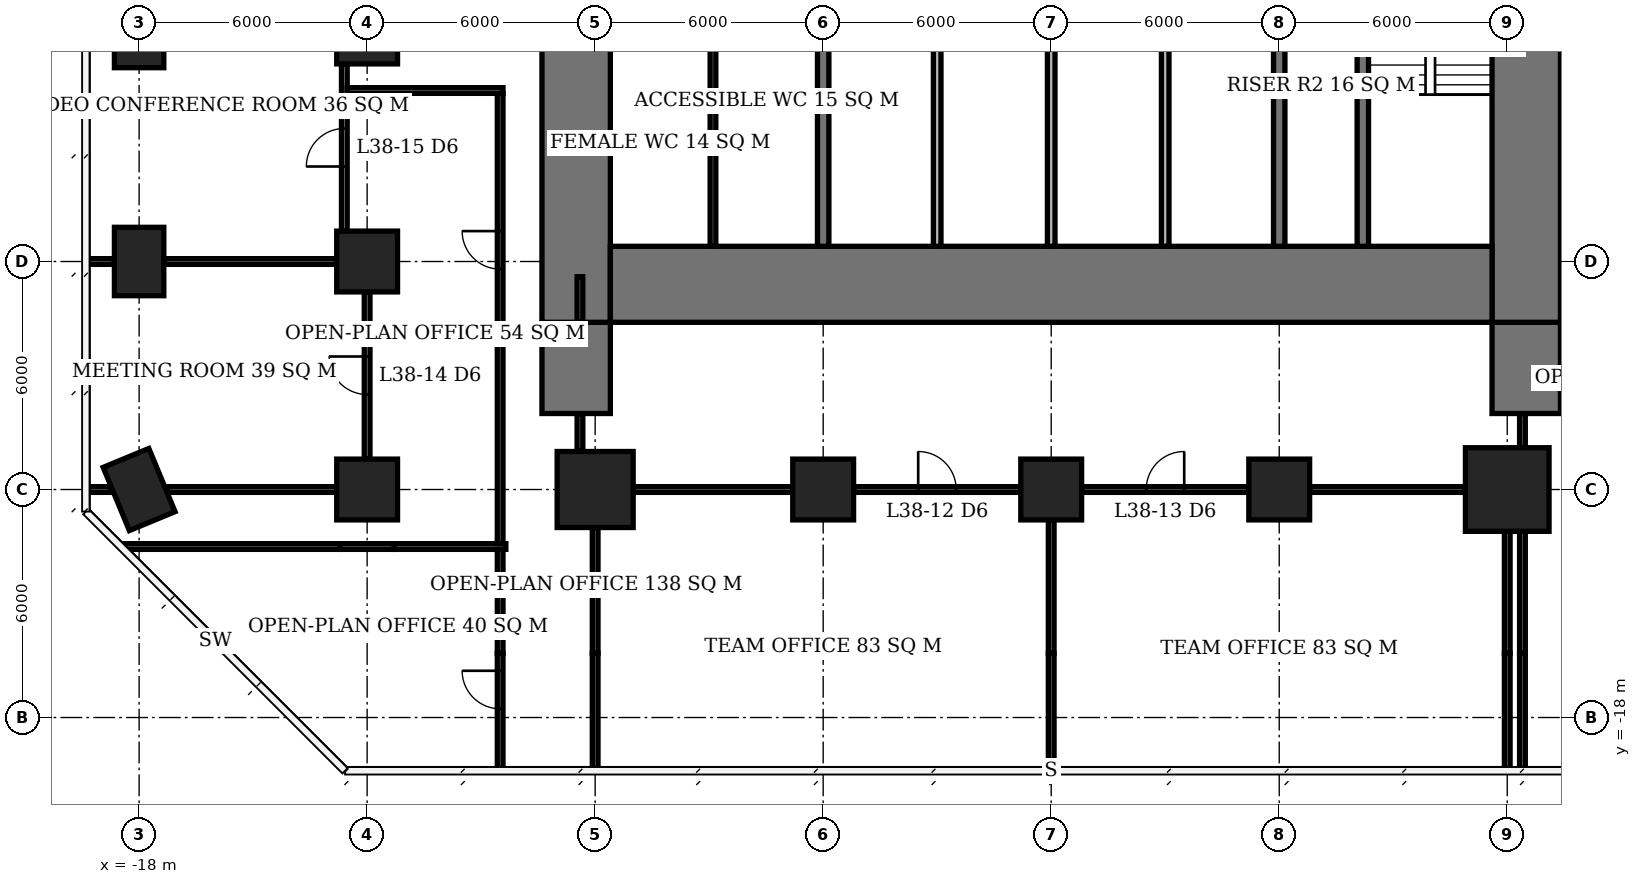
"""IFC4 building model, lengths in metres.
Left out: names, types, materials, properties, quantities, classifications, styles, units other than length and angle.
Written with IfcOpenShell. Run it as: python <this file> out.ifc"""

import sys

from ifc_helpers import new_model, si_unit, direction, frame, frame_2d, origin, origin_2d, place, context, subcontext, project, spatial, rectangle, extrude, element, fill, save


model = new_model("IFC4")
c1 = context("Model", 3, precision=1e-05, world=origin(), true_north=direction((0.0, 1.0)))
c2 = subcontext(c1, "Body", "Model", "MODEL_VIEW")
j1 = project(units=[si_unit("LENGTHUNIT", "METRE"), si_unit("PLANEANGLEUNIT", "RADIAN")], contexts=[c1])
p1 = place(None, origin())
s1 = spatial("IfcSite", under=j1, at=p1, CompositionType="ELEMENT")
p2 = place(p1, origin())
s2 = spatial("IfcBuilding", under=s1, at=p2, CompositionType="ELEMENT")
p3 = place(p2, frame((0.0, 0.0, 156.2)))
s3 = spatial("IfcBuildingStorey", under=s2, at=p3, CompositionType="ELEMENT", Elevation=156.2)
for number, where, z_axis, x_axis in (
    (1, (-18.0, -12.0, 0.0), (0.0, 0.0, 1.0), (-0.383, 0.924, 0.0)),
    (2, (-18.0, -6.0, 0.0), (0.0, 0.0, 1.0), (0.0, 1.0, 0.0)),
    (3, (-18.0, 0.0, 0.0), (0.0, 0.0, 1.0), (0.0, 1.0, 0.0)),
):
    element("IfcColumn", number, at=place(p3, frame(where, z_axis=z_axis, x_axis=x_axis)), inside=s3, PredefinedType="COLUMN", context=c2, shape_type="SweptSolid", body=[
        extrude(rectangle(XDim=1.8, YDim=1.3, at=origin_2d()), origin(), (0.0, 0.0, 1.0), 3.9),
    ])
for number, where, z_axis, x_axis in (
    (4, (-12.0, -12.0, 0.0), (0.0, 0.0, 1.0), (1.0, 0.0, 0.0)),
    (5, (-12.0, -6.0, 0.0), (0.0, 0.0, 1.0), (1.0, 0.0, 0.0)),
    (6, (-12.0, 0.0, 0.0), (0.0, 0.0, 1.0), (1.0, 0.0, 0.0)),
):
    element("IfcColumn", number, at=place(p3, frame(where, z_axis=z_axis, x_axis=x_axis)), inside=s3, PredefinedType="COLUMN", context=c2, shape_type="SweptSolid", body=[
        extrude(rectangle(XDim=1.6, YDim=1.6, at=origin_2d()), origin(), (0.0, 0.0, 1.0), 3.9),
    ])
p4 = place(p3, frame((-6.0, -12.0, 0.0), z_axis=(0.0, 0.0, 1.0), x_axis=(1.0, 0.0, 0.0)))
e7 = element("IfcColumn", 7, at=p4, inside=s3, PredefinedType="COLUMN", context=c2, shape_type="SweptSolid", body=[
    extrude(rectangle(XDim=2.0, YDim=2.0, at=origin_2d()), origin(), (0.0, 0.0, 1.0), 3.9),
])
for number, where, z_axis, x_axis in (
    (8, (0.0, -12.0, 0.0), (0.0, 0.0, 1.0), (1.0, 0.0, 0.0)),
    (9, (6.0, -12.0, 0.0), (0.0, 0.0, 1.0), (1.0, 0.0, 0.0)),
    (10, (12.0, -12.0, 0.0), (0.0, 0.0, 1.0), (1.0, 0.0, 0.0)),
):
    element("IfcColumn", number, at=place(p3, frame(where, z_axis=z_axis, x_axis=x_axis)), inside=s3, PredefinedType="COLUMN", context=c2, shape_type="SweptSolid", body=[
        extrude(rectangle(XDim=1.6, YDim=1.6, at=origin_2d()), origin(), (0.0, 0.0, 1.0), 3.9),
    ])
p5 = place(p3, frame((18.0, -12.0, 0.0), z_axis=(0.0, 0.0, 1.0), x_axis=(1.0, 0.0, 0.0)))
e11 = element("IfcColumn", 11, at=p5, inside=s3, PredefinedType="COLUMN", context=c2, shape_type="SweptSolid", body=[
    extrude(rectangle(XDim=2.2, YDim=2.2, at=origin_2d()), origin(), (0.0, 0.0, 1.0), 3.9),
])
p6 = place(p3, frame((-5.6, -6.6, 0.0), z_axis=(0.0, 0.0, 1.0), x_axis=(1.0, 0.0, 0.0)))
e12 = element("IfcWall", 12, at=p6, inside=s3, PredefinedType="SHEAR", context=c2, shape_type="SweptSolid", body=[
    extrude(rectangle(XDim=23.2, YDim=2.0, at=frame_2d((11.6, 0.0))), origin(), (0.0, 0.0, 1.0), 3.9),
])
p7 = place(p3, frame((-6.5, -7.6, 0.0), z_axis=(0.0, 0.0, 1.0), x_axis=(0.0, 1.0, 0.0)))
e13 = element("IfcWall", 13, at=p7, inside=s3, PredefinedType="SHEAR", context=c2, shape_type="SweptSolid", body=[
    extrude(rectangle(XDim=21.2, YDim=1.8, at=frame_2d((10.6, 0.0))), origin(), (0.0, 0.0, 1.0), 3.9),
])
p8 = place(p7, frame((7.8, 0.0, 0.0)))
e14 = element("IfcOpeningElement", 14, at=p8, cuts=e13, PredefinedType="OPENING", context=c2, shape_type="SweptSolid", body=[
    extrude(rectangle(XDim=1.8, YDim=2.4, at=frame_2d((0.9, 1.2))), frame((0.0, 0.91, 0.0), z_axis=(0.0, -1.0, 0.0), x_axis=(1.0, 0.0, 0.0)), (0.0, 0.0, 1.0), 1.82),
])
p9 = place(p3, frame((18.5, -7.6, 0.0), z_axis=(0.0, 0.0, 1.0), x_axis=(0.0, 1.0, 0.0)))
e15 = element("IfcWall", 15, at=p9, inside=s3, PredefinedType="SHEAR", context=c2, shape_type="SweptSolid", body=[
    extrude(rectangle(XDim=21.2, YDim=1.8, at=frame_2d((10.6, 0.0))), origin(), (0.0, 0.0, 1.0), 3.9),
])
p10 = place(p9, frame((9.2, 0.0, 0.0)))
e16 = element("IfcOpeningElement", 16, at=p10, cuts=e15, PredefinedType="OPENING", context=c2, shape_type="SweptSolid", body=[
    extrude(rectangle(XDim=1.8, YDim=2.4, at=frame_2d((0.9, 1.2))), frame((0.0, 0.91, 0.0), z_axis=(0.0, -1.0, 0.0), x_axis=(1.0, 0.0, 0.0)), (0.0, 0.0, 1.0), 1.82),
])
for number, where, z_axis, x_axis in (
    (17, (-6.5, -10.0, 0.0), (0.0, 0.0, 1.0), (0.0, 1.0, 0.0)),
    (18, (18.5, -10.0, 0.0), (0.0, 0.0, 1.0), (0.0, 1.0, 0.0)),
):
    element("IfcWall", number, at=place(p3, frame(where, z_axis=z_axis, x_axis=x_axis)), inside=s3, PredefinedType="SHEAR", context=c2, shape_type="SweptSolid", body=[
        extrude(rectangle(XDim=2.4, YDim=1.8, at=frame_2d((1.2, 0.0))), origin(), (0.0, 0.0, 1.0), 3.9),
    ])
for number, where, z_axis, x_axis in (
    (19, (0.0, -5.6, 0.0), (0.0, 0.0, 1.0), (0.0, 1.0, 0.0)),
    (20, (12.0, -5.6, 0.0), (0.0, 0.0, 1.0), (0.0, 1.0, 0.0)),
):
    element("IfcWall", number, at=place(p3, frame(where, z_axis=z_axis, x_axis=x_axis)), inside=s3, PredefinedType="SHEAR", context=c2, shape_type="SweptSolid", body=[
        extrude(rectangle(XDim=5.45, YDim=0.3, at=frame_2d((2.725, 0.0))), origin(), (0.0, 0.0, 1.0), 3.9),
    ])
p11 = place(p3, frame((14.2, -5.6, 0.0), z_axis=(0.0, 0.0, 1.0), x_axis=(0.0, 1.0, 0.0)))
e21 = element("IfcWall", 21, at=p11, inside=s3, PredefinedType="SHEAR", context=c2, shape_type="SweptSolid", body=[
    extrude(rectangle(XDim=8.45, YDim=0.3, at=frame_2d((4.225, 0.0))), origin(), (0.0, 0.0, 1.0), 3.9),
])
for number, where, z_axis, x_axis in (
    (22, (3.0, -5.6, 0.0), (0.0, 0.0, 1.0), (0.0, 1.0, 0.0)),
    (23, (6.0, -5.6, 0.0), (0.0, 0.0, 1.0), (0.0, 1.0, 0.0)),
    (24, (9.0, -5.6, 0.0), (0.0, 0.0, 1.0), (0.0, 1.0, 0.0)),
):
    element("IfcWall", number, at=place(p3, frame(where, z_axis=z_axis, x_axis=x_axis)), inside=s3, PredefinedType="SOLIDWALL", context=c2, shape_type="SweptSolid", body=[
        extrude(rectangle(XDim=5.45, YDim=0.2, at=frame_2d((2.725, 0.0))), origin(), (0.0, 0.0, 1.0), 3.9),
    ])
p12 = place(p3, frame((-2.9, -5.6, 0.0), z_axis=(0.0, 0.0, 1.0), x_axis=(0.0, 1.0, 0.0)))
e25 = element("IfcWall", 25, at=p12, inside=s3, PredefinedType="PLUMBINGWALL", context=c2, shape_type="SweptSolid", body=[
    extrude(rectangle(XDim=5.45, YDim=0.15, at=frame_2d((2.725, 0.0))), origin(), (0.0, 0.0, 1.0), 3.65),
])
p13 = place(p3, frame((-19.4, -12.0, 0.0), z_axis=(0.0, 0.0, 1.0), x_axis=(1.0, 0.0, 0.0)))
e26 = element("IfcWall", 26, at=p13, inside=s3, PredefinedType="PARTITIONING", context=c2, shape_type="SweptSolid", body=[
    extrude(rectangle(XDim=0.665, YDim=0.15, at=frame_2d((0.333, 0.0))), origin(), (0.0, 0.0, 1.0), 3.65),
])
p14 = place(p3, frame((-17.265, -12.0, 0.0), z_axis=(0.0, 0.0, 1.0), x_axis=(1.0, 0.0, 0.0)))
e27 = element("IfcWall", 27, at=p14, inside=s3, PredefinedType="PARTITIONING", context=c2, shape_type="SweptSolid", body=[
    extrude(rectangle(XDim=4.465, YDim=0.15, at=frame_2d((2.233, 0.0))), origin(), (0.0, 0.0, 1.0), 3.65),
])
p15 = place(p3, frame((-5.0, -12.0, 0.0), z_axis=(0.0, 0.0, 1.0), x_axis=(1.0, 0.0, 0.0)))
e28 = element("IfcWall", 28, at=p15, inside=s3, PredefinedType="PARTITIONING", context=c2, shape_type="SweptSolid", body=[
    extrude(rectangle(XDim=4.2, YDim=0.15, at=frame_2d((2.1, 0.0))), origin(), (0.0, 0.0, 1.0), 3.65),
])
p16 = place(p3, frame((0.8, -12.0, 0.0), z_axis=(0.0, 0.0, 1.0), x_axis=(1.0, 0.0, 0.0)))
e29 = element("IfcWall", 29, at=p16, inside=s3, PredefinedType="PARTITIONING", context=c2, shape_type="SweptSolid", body=[
    extrude(rectangle(XDim=4.4, YDim=0.15, at=frame_2d((2.2, 0.0))), origin(), (0.0, 0.0, 1.0), 3.65),
])
p17 = place(p16, frame((1.7, 0.0, 0.0)))
e30 = element("IfcOpeningElement", 30, at=p17, cuts=e29, PredefinedType="OPENING", context=c2, shape_type="SweptSolid", body=[
    extrude(rectangle(XDim=1.0, YDim=2.1, at=frame_2d((0.5, 1.05))), frame((0.0, 0.085, 0.0), z_axis=(0.0, -1.0, 0.0), x_axis=(1.0, 0.0, 0.0)), (0.0, 0.0, 1.0), 0.17),
])
p18 = place(p3, frame((6.8, -12.0, 0.0), z_axis=(0.0, 0.0, 1.0), x_axis=(1.0, 0.0, 0.0)))
e31 = element("IfcWall", 31, at=p18, inside=s3, PredefinedType="PARTITIONING", context=c2, shape_type="SweptSolid", body=[
    extrude(rectangle(XDim=4.4, YDim=0.15, at=frame_2d((2.2, 0.0))), origin(), (0.0, 0.0, 1.0), 3.65),
])
p19 = place(p18, frame((1.7, 0.0, 0.0)))
e32 = element("IfcOpeningElement", 32, at=p19, cuts=e31, PredefinedType="OPENING", context=c2, shape_type="SweptSolid", body=[
    extrude(rectangle(XDim=1.0, YDim=2.1, at=frame_2d((0.5, 1.05))), frame((0.0, 0.085, 0.0), z_axis=(0.0, -1.0, 0.0), x_axis=(1.0, 0.0, 0.0)), (0.0, 0.0, 1.0), 0.17),
])
p20 = place(p3, frame((12.8, -12.0, 0.0), z_axis=(0.0, 0.0, 1.0), x_axis=(1.0, 0.0, 0.0)))
e33 = element("IfcWall", 33, at=p20, inside=s3, PredefinedType="PARTITIONING", context=c2, shape_type="SweptSolid", body=[
    extrude(rectangle(XDim=4.1, YDim=0.15, at=frame_2d((2.05, 0.0))), origin(), (0.0, 0.0, 1.0), 3.65),
])
p21 = place(p3, frame((-19.4, -6.0, 0.0), z_axis=(0.0, 0.0, 1.0), x_axis=(1.0, 0.0, 0.0)))
e34 = element("IfcWall", 34, at=p21, inside=s3, PredefinedType="PARTITIONING", context=c2, shape_type="SweptSolid", body=[
    extrude(rectangle(XDim=0.75, YDim=0.15, at=frame_2d((0.375, 0.0))), origin(), (0.0, 0.0, 1.0), 3.65),
])
p22 = place(p3, frame((-17.35, -6.0, 0.0), z_axis=(0.0, 0.0, 1.0), x_axis=(1.0, 0.0, 0.0)))
e35 = element("IfcWall", 35, at=p22, inside=s3, PredefinedType="PARTITIONING", context=c2, shape_type="SweptSolid", body=[
    extrude(rectangle(XDim=4.55, YDim=0.15, at=frame_2d((2.275, 0.0))), origin(), (0.0, 0.0, 1.0), 3.65),
])
p23 = place(p3, frame((-12.6, -5.2, 0.0), z_axis=(0.0, 0.0, 1.0), x_axis=(0.0, 1.0, 0.0)))
e36 = element("IfcWall", 36, at=p23, inside=s3, PredefinedType="PARTITIONING", context=c2, shape_type="SweptSolid", body=[
    extrude(rectangle(XDim=4.4, YDim=0.15, at=frame_2d((2.2, 0.0))), origin(), (0.0, 0.0, 1.0), 3.65),
])
p24 = place(p23, frame((1.7, 0.0, 0.0)))
e37 = element("IfcOpeningElement", 37, at=p24, cuts=e36, PredefinedType="OPENING", context=c2, shape_type="SweptSolid", body=[
    extrude(rectangle(XDim=1.0, YDim=2.1, at=frame_2d((0.5, 1.05))), frame((0.0, 0.085, 0.0), z_axis=(0.0, -1.0, 0.0), x_axis=(1.0, 0.0, 0.0)), (0.0, 0.0, 1.0), 0.17),
])
p25 = place(p3, frame((-12.0, -11.2, 0.0), z_axis=(0.0, 0.0, 1.0), x_axis=(0.0, 1.0, 0.0)))
e38 = element("IfcWall", 38, at=p25, inside=s3, PredefinedType="PARTITIONING", context=c2, shape_type="SweptSolid", body=[
    extrude(rectangle(XDim=4.4, YDim=0.15, at=frame_2d((2.2, 0.0))), origin(), (0.0, 0.0, 1.0), 3.65),
])
p26 = place(p25, frame((1.7, 0.0, 0.0)))
e39 = element("IfcOpeningElement", 39, at=p26, cuts=e38, PredefinedType="OPENING", context=c2, shape_type="SweptSolid", body=[
    extrude(rectangle(XDim=1.0, YDim=2.1, at=frame_2d((0.5, 1.05))), frame((0.0, 0.085, 0.0), z_axis=(0.0, -1.0, 0.0), x_axis=(1.0, 0.0, 0.0)), (0.0, 0.0, 1.0), 0.17),
])
p27 = place(p3, frame((-6.0, -19.4, 0.0), z_axis=(0.0, 0.0, 1.0), x_axis=(0.0, 1.0, 0.0)))
e40 = element("IfcWall", 40, at=p27, inside=s3, PredefinedType="PARTITIONING", context=c2, shape_type="SweptSolid", body=[
    extrude(rectangle(XDim=3.09, YDim=0.15, at=frame_2d((1.545, 0.0))), origin(), (0.0, 0.0, 1.0), 3.65),
])
p28 = place(p3, frame((-6.0, -16.31, 0.0), z_axis=(0.0, 0.0, 1.0), x_axis=(0.0, 1.0, 0.0)))
e41 = element("IfcWall", 41, at=p28, inside=s3, PredefinedType="PARTITIONING", context=c2, shape_type="SweptSolid", body=[
    extrude(rectangle(XDim=3.31, YDim=0.15, at=frame_2d((1.655, 0.0))), origin(), (0.0, 0.0, 1.0), 2.65),
])
p29 = place(p3, frame((6.0, -19.35, 0.0), z_axis=(0.0, 0.0, 1.0), x_axis=(0.0, 1.0, 0.0)))
e42 = element("IfcWall", 42, at=p29, inside=s3, PredefinedType="PARTITIONING", context=c2, shape_type="SweptSolid", body=[
    extrude(rectangle(XDim=3.04, YDim=0.15, at=frame_2d((1.52, 0.0))), origin(), (0.0, 0.0, 1.0), 3.65),
])
p30 = place(p3, frame((6.0, -16.31, 0.0), z_axis=(0.0, 0.0, 1.0), x_axis=(0.0, 1.0, 0.0)))
e43 = element("IfcWall", 43, at=p30, inside=s3, PredefinedType="PARTITIONING", context=c2, shape_type="SweptSolid", body=[
    extrude(rectangle(XDim=3.51, YDim=0.15, at=frame_2d((1.755, 0.0))), origin(), (0.0, 0.0, 1.0), 2.65),
])
p31 = place(p3, frame((18.0, -19.4, 0.0), z_axis=(0.0, 0.0, 1.0), x_axis=(0.0, 1.0, 0.0)))
e44 = element("IfcWall", 44, at=p31, inside=s3, PredefinedType="PARTITIONING", context=c2, shape_type="SweptSolid", body=[
    extrude(rectangle(XDim=3.09, YDim=0.15, at=frame_2d((1.545, 0.0))), origin(), (0.0, 0.0, 1.0), 3.65),
])
p32 = place(p3, frame((18.0, -16.31, 0.0), z_axis=(0.0, 0.0, 1.0), x_axis=(0.0, 1.0, 0.0)))
e45 = element("IfcWall", 45, at=p32, inside=s3, PredefinedType="PARTITIONING", context=c2, shape_type="SweptSolid", body=[
    extrude(rectangle(XDim=3.21, YDim=0.15, at=frame_2d((1.605, 0.0))), origin(), (0.0, 0.0, 1.0), 2.65),
])
p33 = place(p3, frame((-18.389, -13.5, 0.0), z_axis=(0.0, 0.0, 1.0), x_axis=(1.0, 0.0, 0.0)))
e46 = element("IfcWall", 46, at=p33, inside=s3, PredefinedType="PARTITIONING", context=c2, shape_type="SweptSolid", body=[
    extrude(rectangle(XDim=5.679, YDim=0.15, at=frame_2d((2.839, 0.0))), origin(), (0.0, 0.0, 1.0), 3.65),
])
p34 = place(p3, frame((-12.71, -13.5, 0.0), z_axis=(0.0, 0.0, 1.0), x_axis=(1.0, 0.0, 0.0)))
e47 = element("IfcWall", 47, at=p34, inside=s3, PredefinedType="PARTITIONING", context=c2, shape_type="SweptSolid", body=[
    extrude(rectangle(XDim=1.42, YDim=0.15, at=frame_2d((0.71, 0.0))), origin(), (0.0, 0.0, 1.0), 2.65),
])
p35 = place(p3, frame((-11.29, -13.5, 0.0), z_axis=(0.0, 0.0, 1.0), x_axis=(1.0, 0.0, 0.0)))
e48 = element("IfcWall", 48, at=p35, inside=s3, PredefinedType="PARTITIONING", context=c2, shape_type="SweptSolid", body=[
    extrude(rectangle(XDim=2.94, YDim=0.15, at=frame_2d((1.47, 0.0))), origin(), (0.0, 0.0, 1.0), 3.65),
])
p36 = place(p3, frame((-12.525, -1.5, 0.0), z_axis=(0.0, 0.0, 1.0), x_axis=(1.0, 0.0, 0.0)))
e49 = element("IfcWall", 49, at=p36, inside=s3, PredefinedType="PARTITIONING", context=c2, shape_type="SweptSolid", body=[
    extrude(rectangle(XDim=4.1, YDim=0.15, at=frame_2d((2.05, 0.0))), origin(), (0.0, 0.0, 1.0), 3.65),
])
p37 = place(p3, frame((-8.5, -19.4, 0.0), z_axis=(0.0, 0.0, 1.0), x_axis=(0.0, 1.0, 0.0)))
e50 = element("IfcWall", 50, at=p37, inside=s3, PredefinedType="PARTITIONING", context=c2, shape_type="SweptSolid", body=[
    extrude(rectangle(XDim=3.09, YDim=0.15, at=frame_2d((1.545, 0.0))), origin(), (0.0, 0.0, 1.0), 3.65),
])
p38 = place(p37, frame((1.63, 0.0, 0.0)))
e51 = element("IfcOpeningElement", 51, at=p38, cuts=e50, PredefinedType="OPENING", context=c2, shape_type="SweptSolid", body=[
    extrude(rectangle(XDim=1.0, YDim=2.1, at=frame_2d((0.5, 1.05))), frame((0.0, 0.085, 0.0), z_axis=(0.0, -1.0, 0.0), x_axis=(1.0, 0.0, 0.0)), (0.0, 0.0, 1.0), 0.17),
])
p39 = place(p3, frame((-8.5, -16.31, 0.0), z_axis=(0.0, 0.0, 1.0), x_axis=(0.0, 1.0, 0.0)))
e52 = element("IfcWall", 52, at=p39, inside=s3, PredefinedType="PARTITIONING", context=c2, shape_type="SweptSolid", body=[
    extrude(rectangle(XDim=0.72, YDim=0.15, at=frame_2d((0.36, 0.0))), origin(), (0.0, 0.0, 1.0), 2.65),
])
p40 = place(p3, frame((-8.5, -15.59, 0.0), z_axis=(0.0, 0.0, 1.0), x_axis=(0.0, 1.0, 0.0)))
e53 = element("IfcWall", 53, at=p40, inside=s3, PredefinedType="PARTITIONING", context=c2, shape_type="SweptSolid", body=[
    extrude(rectangle(XDim=2.015, YDim=0.15, at=frame_2d((1.008, 0.0))), origin(), (0.0, 0.0, 1.0), 3.65),
])
p41 = place(p3, frame((-8.5, -13.425, 0.0), z_axis=(0.0, 0.0, 1.0), x_axis=(0.0, 1.0, 0.0)))
e54 = element("IfcWall", 54, at=p41, inside=s3, PredefinedType="PARTITIONING", context=c2, shape_type="SweptSolid", body=[
    extrude(rectangle(XDim=11.85, YDim=0.15, at=frame_2d((5.925, 0.0))), origin(), (0.0, 0.0, 1.0), 3.65),
])
p42 = place(p41, frame((7.225, 0.0, 0.0)))
e55 = element("IfcOpeningElement", 55, at=p42, cuts=e54, PredefinedType="OPENING", context=c2, shape_type="SweptSolid", body=[
    extrude(rectangle(XDim=1.0, YDim=2.1, at=frame_2d((0.5, 1.05))), frame((0.0, 0.085, 0.0), z_axis=(0.0, -1.0, 0.0), x_axis=(1.0, 0.0, 0.0)), (0.0, 0.0, 1.0), 0.17),
])
p43 = place(p3, frame((-6.4, -11.0, 0.0), z_axis=(0.0, 0.0, 1.0), x_axis=(0.0, 1.0, 0.0)))
e56 = element("IfcWall", 56, at=p43, inside=s3, PredefinedType="PARTITIONING", context=c2, shape_type="SweptSolid", body=[
    extrude(rectangle(XDim=1.0, YDim=0.15, at=frame_2d((0.5, 0.0))), origin(), (0.0, 0.0, 1.0), 3.65),
])
p44 = place(p3, frame((-6.4, -7.6, 0.0), z_axis=(0.0, 0.0, 1.0), x_axis=(0.0, 1.0, 0.0)))
e57 = element("IfcWall", 57, at=p44, inside=s3, PredefinedType="PARTITIONING", context=c2, shape_type="SweptSolid", body=[
    extrude(rectangle(XDim=1.2, YDim=0.15, at=frame_2d((0.6, 0.0))), origin(), (0.0, 0.0, 1.0), 3.65),
])
p45 = place(p3, frame((18.4, -19.35, 0.0), z_axis=(0.0, 0.0, 1.0), x_axis=(0.0, 1.0, 0.0)))
e58 = element("IfcWall", 58, at=p45, inside=s3, PredefinedType="PARTITIONING", context=c2, shape_type="SweptSolid", body=[
    extrude(rectangle(XDim=3.04, YDim=0.15, at=frame_2d((1.52, 0.0))), origin(), (0.0, 0.0, 1.0), 3.65),
])
p46 = place(p3, frame((18.4, -16.31, 0.0), z_axis=(0.0, 0.0, 1.0), x_axis=(0.0, 1.0, 0.0)))
e59 = element("IfcWall", 59, at=p46, inside=s3, PredefinedType="PARTITIONING", context=c2, shape_type="SweptSolid", body=[
    extrude(rectangle(XDim=3.21, YDim=0.15, at=frame_2d((1.605, 0.0))), origin(), (0.0, 0.0, 1.0), 2.65),
])
p47 = place(p3, frame((18.4, -10.9, 0.0), z_axis=(0.0, 0.0, 1.0), x_axis=(0.0, 1.0, 0.0)))
e60 = element("IfcWall", 60, at=p47, inside=s3, PredefinedType="PARTITIONING", context=c2, shape_type="SweptSolid", body=[
    extrude(rectangle(XDim=0.9, YDim=0.15, at=frame_2d((0.45, 0.0))), origin(), (0.0, 0.0, 1.0), 3.65),
])
p48 = place(p3, frame((18.4, -7.6, 0.0), z_axis=(0.0, 0.0, 1.0), x_axis=(0.0, 1.0, 0.0)))
e61 = element("IfcWall", 61, at=p48, inside=s3, PredefinedType="PARTITIONING", context=c2, shape_type="SweptSolid", body=[
    extrude(rectangle(XDim=1.2, YDim=0.15, at=frame_2d((0.6, 0.0))), origin(), (0.0, 0.0, 1.0), 3.65),
])
p49 = place(p17, origin())
e62 = element("IfcDoor", 62, at=p49, inside=s3, OperationType="SINGLE_SWING_LEFT", PredefinedType="DOOR", context=c2, shape_type="SweptSolid", body=[
    extrude(rectangle(XDim=1.0, YDim=2.1, at=frame_2d((0.5, 1.05))), frame((0.0, 0.025, 0.0), z_axis=(0.0, -1.0, 0.0), x_axis=(1.0, 0.0, 0.0)), (0.0, 0.0, 1.0), 0.05),
])
fill(e30, e62)
p50 = place(p19, origin())
e63 = element("IfcDoor", 63, at=p50, inside=s3, OperationType="SINGLE_SWING_RIGHT", PredefinedType="DOOR", context=c2, shape_type="SweptSolid", body=[
    extrude(rectangle(XDim=1.0, YDim=2.1, at=frame_2d((0.5, 1.05))), frame((0.0, 0.025, 0.0), z_axis=(0.0, -1.0, 0.0), x_axis=(1.0, 0.0, 0.0)), (0.0, 0.0, 1.0), 0.05),
])
fill(e32, e63)
p51 = place(p26, origin())
e64 = element("IfcDoor", 64, at=p51, inside=s3, OperationType="SINGLE_SWING_RIGHT", PredefinedType="DOOR", context=c2, shape_type="SweptSolid", body=[
    extrude(rectangle(XDim=1.0, YDim=2.1, at=frame_2d((0.5, 1.05))), frame((0.0, 0.025, 0.0), z_axis=(0.0, -1.0, 0.0), x_axis=(1.0, 0.0, 0.0)), (0.0, 0.0, 1.0), 0.05),
])
fill(e39, e64)
p52 = place(p24, origin())
e65 = element("IfcDoor", 65, at=p52, inside=s3, OperationType="SINGLE_SWING_LEFT", PredefinedType="DOOR", context=c2, shape_type="SweptSolid", body=[
    extrude(rectangle(XDim=1.0, YDim=2.1, at=frame_2d((0.5, 1.05))), frame((0.0, 0.025, 0.0), z_axis=(0.0, -1.0, 0.0), x_axis=(1.0, 0.0, 0.0)), (0.0, 0.0, 1.0), 0.05),
])
fill(e37, e65)
p53 = place(p38, origin())
e66 = element("IfcDoor", 66, at=p53, inside=s3, OperationType="SINGLE_SWING_RIGHT", PredefinedType="DOOR", context=c2, shape_type="SweptSolid", body=[
    extrude(rectangle(XDim=1.0, YDim=2.1, at=frame_2d((0.5, 1.05))), frame((0.0, 0.025, 0.0), z_axis=(0.0, -1.0, 0.0), x_axis=(1.0, 0.0, 0.0)), (0.0, 0.0, 1.0), 0.05),
])
fill(e51, e66)
p54 = place(p42, origin())
e67 = element("IfcDoor", 67, at=p54, inside=s3, OperationType="SINGLE_SWING_RIGHT", PredefinedType="DOOR", context=c2, shape_type="SweptSolid", body=[
    extrude(rectangle(XDim=1.0, YDim=2.1, at=frame_2d((0.5, 1.05))), frame((0.0, 0.025, 0.0), z_axis=(0.0, -1.0, 0.0), x_axis=(1.0, 0.0, 0.0)), (0.0, 0.0, 1.0), 0.05),
])
fill(e55, e67)
save(model, sys.argv[1])
